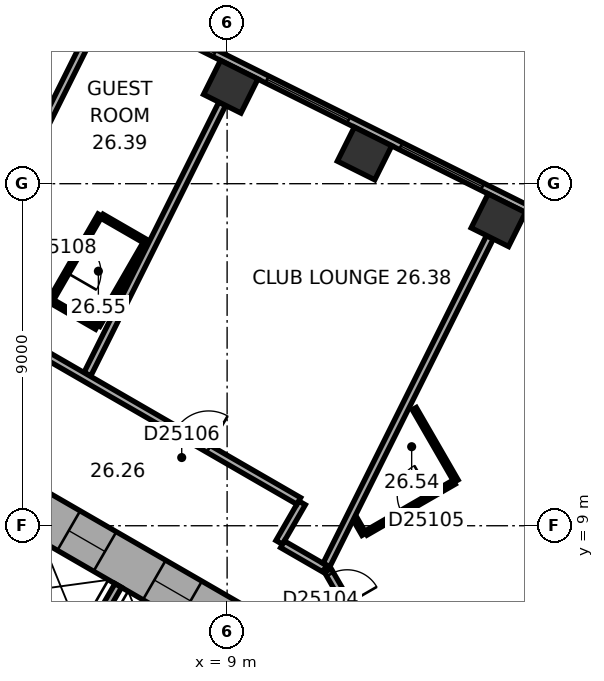
"""IFC4 building model, lengths in metres.
Left out: names, types, materials, properties, quantities, classifications, styles, units other than length and angle.
Written with IfcOpenShell. Run it as: python <this file> out.ifc"""

import sys

from ifc_helpers import new_model, si_unit, direction, frame, frame_2d, origin, origin_2d, place, context, subcontext, project, spatial, rectangle, extrude, element, fill, save


model = new_model("IFC4")
c1 = context("Model", 3, precision=1e-05, world=origin(), true_north=direction((0.0, 1.0)))
c2 = subcontext(c1, "Body", "Model", "MODEL_VIEW")
j1 = project(units=[si_unit("LENGTHUNIT", "METRE"), si_unit("PLANEANGLEUNIT", "RADIAN")], contexts=[c1])
p1 = place(None, origin())
s1 = spatial("IfcSite", under=j1, at=p1, CompositionType="ELEMENT")
p2 = place(p1, origin())
s2 = spatial("IfcBuilding", under=s1, at=p2, CompositionType="ELEMENT")
p3 = place(p2, frame((0.0, 0.0, 110.0)))
s3 = spatial("IfcBuildingStorey", under=s2, at=p3, CompositionType="ELEMENT", Elevation=110.0)
for number, where, z_axis, x_axis in (
    (1, (16.138, 17.04, 0.0), (0.0, 0.0, 1.0), (-0.895, 0.446, 0.0)),
    (2, (12.616, 18.795, 0.0), (0.0, 0.0, 1.0), (-0.895, 0.446, 0.0)),
    (3, (9.095, 20.551, 0.0), (0.0, 0.0, 1.0), (-0.895, 0.446, 0.0)),
):
    element("IfcColumn", number, at=place(p3, frame(where, z_axis=z_axis, x_axis=x_axis)), inside=s3, PredefinedType="COLUMN", context=c2, shape_type="SweptSolid", body=[
        extrude(rectangle(XDim=1.1, YDim=1.0, at=origin_2d()), origin(), (0.0, 0.0, 1.0), 3.3),
    ])
p4 = place(p3, frame((10.4, 5.658, 0.0), z_axis=(0.0, 0.0, 1.0), x_axis=(-0.866021384402, 0.500006961711, 0.0)))
e4 = element("IfcWall", 4, at=p4, inside=s3, PredefinedType="SHEAR", context=c2, shape_type="SweptSolid", body=[
    extrude(rectangle(XDim=12.355, YDim=1.2, at=frame_2d((6.178, 0.0))), origin(), (0.0, 0.0, 1.0), 3.3),
])
p5 = place(p4, frame((2.728, 0.0, 0.0)))
e5 = element("IfcOpeningElement", 5, at=p5, cuts=e4, PredefinedType="OPENING", context=c2, shape_type="SweptSolid", body=[
    extrude(rectangle(XDim=1.1, YDim=2.1, at=frame_2d((0.55, 1.05))), frame((0.0, 0.61, 0.0), z_axis=(0.0, -1.0, 0.0), x_axis=(1.0, 0.0, 0.0)), (0.0, 0.0, 1.0), 1.22),
])
p6 = place(p4, frame((5.328, 0.0, 0.0)))
e6 = element("IfcOpeningElement", 6, at=p6, cuts=e4, PredefinedType="OPENING", context=c2, shape_type="SweptSolid", body=[
    extrude(rectangle(XDim=1.1, YDim=2.1, at=frame_2d((0.55, 1.05))), frame((0.0, 0.61, 0.0), z_axis=(0.0, -1.0, 0.0), x_axis=(1.0, 0.0, 0.0)), (0.0, 0.0, 1.0), 1.22),
])
p7 = place(p4, frame((7.928, 0.0, 0.0)))
e7 = element("IfcOpeningElement", 7, at=p7, cuts=e4, PredefinedType="OPENING", context=c2, shape_type="SweptSolid", body=[
    extrude(rectangle(XDim=1.1, YDim=2.1, at=frame_2d((0.55, 1.05))), frame((0.0, 0.61, 0.0), z_axis=(0.0, -1.0, 0.0), x_axis=(1.0, 0.0, 0.0)), (0.0, 0.0, 1.0), 1.22),
])
p8 = place(p3, frame((20.63, 15.47, 0.0), z_axis=(0.0, 0.0, 1.0), x_axis=(-0.894934518609, 0.446197498203, 0.0)))
e8 = element("IfcWall", 8, at=p8, inside=s3, PredefinedType="STANDARD", context=c2, shape_type="SweptSolid", body=[
    extrude(rectangle(XDim=21.246, YDim=0.2, at=frame_2d((10.623, 0.0))), origin(), (0.0, 0.0, 1.0), 3.3),
])
p9 = place(p8, frame((1.553, 0.0, 0.8)))
e9 = element("IfcOpeningElement", 9, at=p9, cuts=e8, PredefinedType="OPENING", context=c2, shape_type="SweptSolid", body=[
    extrude(rectangle(XDim=2.4, YDim=1.7, at=frame_2d((1.2, 0.85))), frame((0.0, 0.11, 0.0), z_axis=(0.0, -1.0, 0.0), x_axis=(1.0, 0.0, 0.0)), (0.0, 0.0, 1.0), 0.22),
])
p10 = place(p8, frame((5.488, 0.0, 0.8)))
e10 = element("IfcOpeningElement", 10, at=p10, cuts=e8, PredefinedType="OPENING", context=c2, shape_type="SweptSolid", body=[
    extrude(rectangle(XDim=2.4, YDim=1.7, at=frame_2d((1.2, 0.85))), frame((0.0, 0.11, 0.0), z_axis=(0.0, -1.0, 0.0), x_axis=(1.0, 0.0, 0.0)), (0.0, 0.0, 1.0), 0.22),
])
p11 = place(p8, frame((9.422, 0.0, 0.8)))
e11 = element("IfcOpeningElement", 11, at=p11, cuts=e8, PredefinedType="OPENING", context=c2, shape_type="SweptSolid", body=[
    extrude(rectangle(XDim=2.4, YDim=1.7, at=frame_2d((1.2, 0.85))), frame((0.0, 0.11, 0.0), z_axis=(0.0, -1.0, 0.0), x_axis=(1.0, 0.0, 0.0)), (0.0, 0.0, 1.0), 0.22),
])
p12 = place(p8, frame((13.357, 0.0, 0.8)))
e12 = element("IfcOpeningElement", 12, at=p12, cuts=e8, PredefinedType="OPENING", context=c2, shape_type="SweptSolid", body=[
    extrude(rectangle(XDim=2.4, YDim=1.7, at=frame_2d((1.2, 0.85))), frame((0.0, 0.11, 0.0), z_axis=(0.0, -1.0, 0.0), x_axis=(1.0, 0.0, 0.0)), (0.0, 0.0, 1.0), 0.22),
])
p13 = place(p8, frame((17.292, 0.0, 0.8)))
e13 = element("IfcOpeningElement", 13, at=p13, cuts=e8, PredefinedType="OPENING", context=c2, shape_type="SweptSolid", body=[
    extrude(rectangle(XDim=2.4, YDim=1.7, at=frame_2d((1.2, 0.85))), frame((0.0, 0.11, 0.0), z_axis=(0.0, -1.0, 0.0), x_axis=(1.0, 0.0, 0.0)), (0.0, 0.0, 1.0), 0.22),
])
p14 = place(p3, frame((7.424, 4.259, 0.0), z_axis=(0.0, 0.0, 1.0), x_axis=(-0.866026010844, 0.49999894854, 0.0)))
e14 = element("IfcWall", 14, at=p14, inside=s3, PredefinedType="PARTITIONING", context=c2, shape_type="SweptSolid", body=[
    extrude(rectangle(XDim=8.0, YDim=0.2, at=frame_2d((4.0, 0.0))), origin(), (0.0, 0.0, 1.0), 3.05),
])
p15 = place(p3, frame((5.036, 5.522, 0.0), z_axis=(0.0, 0.0, 1.0), x_axis=(0.499946605688, 0.86605622881, 0.0)))
e15 = element("IfcWall", 15, at=p15, inside=s3, PredefinedType="PARTITIONING", context=c2, shape_type="SweptSolid", body=[
    extrude(rectangle(XDim=2.2, YDim=0.2, at=frame_2d((1.1, 0.0))), origin(), (0.0, 0.0, 1.0), 3.05),
])
p16 = place(p3, frame((6.303, 4.617, 0.0), z_axis=(0.0, 0.0, 1.0), x_axis=(-0.866027801685, 0.499995846692, 0.0)))
e16 = element("IfcWall", 16, at=p16, inside=s3, PredefinedType="SHEAR", context=c2, shape_type="SweptSolid", body=[
    extrude(rectangle(XDim=7.06, YDim=0.3, at=frame_2d((3.53, 0.0))), origin(), (0.0, 0.0, 1.0), 3.05),
])
p17 = place(p3, frame((4.356, 14.922, 0.0), z_axis=(0.0, 0.0, 1.0), x_axis=(0.499936506574, 0.866062058628, 0.0)))
e17 = element("IfcWall", 17, at=p17, inside=s3, PredefinedType="PARTITIONING", context=c2, shape_type="SweptSolid", body=[
    extrude(rectangle(XDim=2.6, YDim=0.12, at=frame_2d((1.3, 0.0))), origin(), (0.0, 0.0, 1.0), 3.05),
])
p18 = place(p17, frame((0.85, 0.0, 0.0)))
e18 = element("IfcOpeningElement", 18, at=p18, cuts=e17, PredefinedType="OPENING", context=c2, shape_type="SweptSolid", body=[
    extrude(rectangle(XDim=0.9, YDim=2.1, at=frame_2d((0.45, 1.05))), frame((0.0, 0.07, 0.0), z_axis=(0.0, -1.0, 0.0), x_axis=(1.0, 0.0, 0.0)), (0.0, 0.0, 1.0), 0.14),
])
p19 = place(p3, frame((5.351, 21.859, 0.0), z_axis=(0.0, 0.0, 1.0), x_axis=(-0.446205309328, -0.894930624086, 0.0)))
e19 = element("IfcWall", 19, at=p19, inside=s3, PredefinedType="PARTITIONING", context=c2, shape_type="SweptSolid", body=[
    extrude(rectangle(XDim=8.913, YDim=0.2, at=frame_2d((4.457, 0.0))), origin(), (0.0, 0.0, 1.0), 2.6),
])
p20 = place(p3, frame((5.569, 14.222, 0.0), z_axis=(0.0, 0.0, 1.0), x_axis=(-0.866036909293, 0.499980071345, 0.0)))
e20 = element("IfcWall", 20, at=p20, inside=s3, PredefinedType="PARTITIONING", context=c2, shape_type="SweptSolid", body=[
    extrude(rectangle(XDim=1.34, YDim=0.12, at=frame_2d((0.67, 0.0))), origin(), (0.0, 0.0, 1.0), 3.05),
])
p21 = place(p3, frame((5.708, 17.144, 0.0), z_axis=(0.0, 0.0, 1.0), x_axis=(0.866082447003, -0.499901185229, 0.0)))
e21 = element("IfcWall", 21, at=p21, inside=s3, PredefinedType="PARTITIONING", context=c2, shape_type="SweptSolid", body=[
    extrude(rectangle(XDim=1.34, YDim=0.12, at=frame_2d((0.67, 0.0))), origin(), (0.0, 0.0, 1.0), 3.05),
])
p22 = place(p3, frame((6.839, 16.422, 0.0), z_axis=(0.0, 0.0, 1.0), x_axis=(-0.50000366821, -0.866023285932, 0.0)))
e22 = element("IfcWall", 22, at=p22, inside=s3, PredefinedType="PARTITIONING", context=c2, shape_type="SweptSolid", body=[
    extrude(rectangle(XDim=2.48, YDim=0.12, at=frame_2d((1.24, 0.0))), origin(), (0.0, 0.0, 1.0), 3.05),
])
p23 = place(p3, frame((8.872, 20.104, 0.0), z_axis=(0.0, 0.0, 1.0), x_axis=(-0.446218378653, -0.894924107706, 0.0)))
e23 = element("IfcWall", 23, at=p23, inside=s3, PredefinedType="PARTITIONING", context=c2, shape_type="SweptSolid", body=[
    extrude(rectangle(XDim=7.95, YDim=0.2, at=frame_2d((3.975, 0.0))), origin(), (0.0, 0.0, 1.0), 3.05),
])
p24 = place(p3, frame((10.371, 8.561, 0.0), z_axis=(0.0, 0.0, 1.0), x_axis=(0.499986357472, 0.866033280158, 0.0)))
e24 = element("IfcWall", 24, at=p24, inside=s3, PredefinedType="PARTITIONING", context=c2, shape_type="SweptSolid", body=[
    extrude(rectangle(XDim=1.201, YDim=0.2, at=frame_2d((0.601, 0.0))), origin(), (0.0, 0.0, 1.0), 3.05),
])
p25 = place(p3, frame((10.885, 9.652, 0.0), z_axis=(0.0, 0.0, 1.0), x_axis=(-0.866033868542, 0.499985338323, 0.0)))
e25 = element("IfcWall", 25, at=p25, inside=s3, PredefinedType="PARTITIONING", context=c2, shape_type="SweptSolid", body=[
    extrude(rectangle(XDim=8.602, YDim=0.2, at=frame_2d((4.301, 0.0))), origin(), (0.0, 0.0, 1.0), 3.05),
])
p26 = place(p25, frame((2.739, 0.0, 0.0)))
e26 = element("IfcOpeningElement", 26, at=p26, cuts=e25, PredefinedType="OPENING", context=c2, shape_type="SweptSolid", body=[
    extrude(rectangle(XDim=1.0, YDim=2.1, at=frame_2d((0.5, 1.05))), frame((0.0, 0.11, 0.0), z_axis=(0.0, -1.0, 0.0), x_axis=(1.0, 0.0, 0.0)), (0.0, 0.0, 1.0), 0.22),
])
p27 = place(p3, frame((11.566, 7.871, 0.0), z_axis=(0.0, 0.0, 1.0), x_axis=(-0.866004557827, 0.500036104519, 0.0)))
e27 = element("IfcWall", 27, at=p27, inside=s3, PredefinedType="PARTITIONING", context=c2, shape_type="SweptSolid", body=[
    extrude(rectangle(XDim=1.28, YDim=0.2, at=frame_2d((0.64, 0.0))), origin(), (0.0, 0.0, 1.0), 3.05),
])
p28 = place(p3, frame((12.218, 6.839, 0.0), z_axis=(0.0, 0.0, 1.0), x_axis=(-0.500044870432, 0.865999496279, 0.0)))
e28 = element("IfcWall", 28, at=p28, inside=s3, PredefinedType="PARTITIONING", context=c2, shape_type="SweptSolid", body=[
    extrude(rectangle(XDim=1.136, YDim=0.2, at=frame_2d((0.568, 0.0))), origin(), (0.0, 0.0, 1.0), 3.05),
])
p29 = place(p28, frame((0.118, 0.0, 0.0)))
e29 = element("IfcOpeningElement", 29, at=p29, cuts=e28, PredefinedType="OPENING", context=c2, shape_type="SweptSolid", body=[
    extrude(rectangle(XDim=0.9, YDim=2.1, at=frame_2d((0.45, 1.05))), frame((0.0, 0.11, 0.0), z_axis=(0.0, -1.0, 0.0), x_axis=(1.0, 0.0, 0.0)), (0.0, 0.0, 1.0), 0.22),
])
p30 = place(p3, frame((12.601, 8.776, 0.0), z_axis=(0.0, 0.0, 1.0), x_axis=(-0.500166486798, 0.865929261247, 0.0)))
e30 = element("IfcWall", 30, at=p30, inside=s3, PredefinedType="PARTITIONING", context=c2, shape_type="SweptSolid", body=[
    extrude(rectangle(XDim=0.476, YDim=0.12, at=frame_2d((0.238, 0.0))), origin(), (0.0, 0.0, 1.0), 3.05),
])
p31 = place(p3, frame((13.926, 12.081, 0.0), z_axis=(0.0, 0.0, 1.0), x_axis=(0.499994660107, -0.866028486751, 0.0)))
e31 = element("IfcWall", 31, at=p31, inside=s3, PredefinedType="PARTITIONING", context=c2, shape_type="SweptSolid", body=[
    extrude(rectangle(XDim=2.2, YDim=0.12, at=frame_2d((1.1, 0.0))), origin(), (0.0, 0.0, 1.0), 3.05),
])
p32 = place(p3, frame((14.974, 10.146, 0.0), z_axis=(0.0, 0.0, 1.0), x_axis=(-0.86599746015, -0.500048396672, 0.0)))
e32 = element("IfcWall", 32, at=p32, inside=s3, PredefinedType="PARTITIONING", context=c2, shape_type="SweptSolid", body=[
    extrude(rectangle(XDim=2.68, YDim=0.12, at=frame_2d((1.34, 0.0))), origin(), (0.0, 0.0, 1.0), 3.05),
])
p33 = place(p32, frame((0.69, 0.0, 0.0)))
e33 = element("IfcOpeningElement", 33, at=p33, cuts=e32, PredefinedType="OPENING", context=c2, shape_type="SweptSolid", body=[
    extrude(rectangle(XDim=0.9, YDim=2.1, at=frame_2d((0.45, 1.05))), frame((0.0, 0.07, 0.0), z_axis=(0.0, -1.0, 0.0), x_axis=(1.0, 0.0, 0.0)), (0.0, 0.0, 1.0), 0.14),
])
p34 = place(p3, frame((15.915, 16.592, 0.0), z_axis=(0.0, 0.0, 1.0), x_axis=(-0.446199736347, -0.894933402709, 0.0)))
e34 = element("IfcWall", 34, at=p34, inside=s3, PredefinedType="PARTITIONING", context=c2, shape_type="SweptSolid", body=[
    extrude(rectangle(XDim=9.635, YDim=0.2, at=frame_2d((4.817, 0.0))), origin(), (0.0, 0.0, 1.0), 3.05),
])
p35 = place(p10, origin())
e35 = element("IfcWindow", 35, at=p35, inside=s3, PartitioningType="SINGLE_PANEL", PredefinedType="WINDOW", context=c2, shape_type="SweptSolid", body=[
    extrude(rectangle(XDim=2.4, YDim=1.7, at=frame_2d((1.2, 0.85))), frame((0.0, 0.03, 0.0), z_axis=(0.0, -1.0, 0.0), x_axis=(1.0, 0.0, 0.0)), (0.0, 0.0, 1.0), 0.06),
])
fill(e10, e35)
p36 = place(p11, origin())
e36 = element("IfcWindow", 36, at=p36, inside=s3, PartitioningType="SINGLE_PANEL", PredefinedType="WINDOW", context=c2, shape_type="SweptSolid", body=[
    extrude(rectangle(XDim=2.4, YDim=1.7, at=frame_2d((1.2, 0.85))), frame((0.0, 0.03, 0.0), z_axis=(0.0, -1.0, 0.0), x_axis=(1.0, 0.0, 0.0)), (0.0, 0.0, 1.0), 0.06),
])
fill(e11, e36)
p37 = place(p12, origin())
e37 = element("IfcWindow", 37, at=p37, inside=s3, PartitioningType="SINGLE_PANEL", PredefinedType="WINDOW", context=c2, shape_type="SweptSolid", body=[
    extrude(rectangle(XDim=2.4, YDim=1.7, at=frame_2d((1.2, 0.85))), frame((0.0, 0.03, 0.0), z_axis=(0.0, -1.0, 0.0), x_axis=(1.0, 0.0, 0.0)), (0.0, 0.0, 1.0), 0.06),
])
fill(e12, e37)
p38 = place(p5, origin())
e38 = element("IfcDoor", 38, at=p38, inside=s3, OperationType="DOUBLE_DOOR_SLIDING", PredefinedType="DOOR", context=c2, shape_type="SweptSolid", body=[
    extrude(rectangle(XDim=1.1, YDim=2.1, at=frame_2d((0.55, 1.05))), frame((0.0, 0.025, 0.0), z_axis=(0.0, -1.0, 0.0), x_axis=(1.0, 0.0, 0.0)), (0.0, 0.0, 1.0), 0.05),
])
fill(e5, e38)
p39 = place(p6, origin())
e39 = element("IfcDoor", 39, at=p39, inside=s3, OperationType="DOUBLE_DOOR_SLIDING", PredefinedType="DOOR", context=c2, shape_type="SweptSolid", body=[
    extrude(rectangle(XDim=1.1, YDim=2.1, at=frame_2d((0.55, 1.05))), frame((0.0, 0.025, 0.0), z_axis=(0.0, -1.0, 0.0), x_axis=(1.0, 0.0, 0.0)), (0.0, 0.0, 1.0), 0.05),
])
fill(e6, e39)
p40 = place(p29, origin())
e40 = element("IfcDoor", 40, at=p40, inside=s3, OperationType="SINGLE_SWING_LEFT", PredefinedType="DOOR", context=c2, shape_type="SweptSolid", body=[
    extrude(rectangle(XDim=0.9, YDim=2.1, at=frame_2d((0.45, 1.05))), frame((0.0, 0.025, 0.0), z_axis=(0.0, -1.0, 0.0), x_axis=(1.0, 0.0, 0.0)), (0.0, 0.0, 1.0), 0.05),
])
fill(e29, e40)
p41 = place(p33, origin())
e41 = element("IfcDoor", 41, at=p41, inside=s3, OperationType="SINGLE_SWING_LEFT", PredefinedType="DOOR", context=c2, shape_type="SweptSolid", body=[
    extrude(rectangle(XDim=0.9, YDim=2.1, at=frame_2d((0.45, 1.05))), frame((0.0, 0.025, 0.0), z_axis=(0.0, -1.0, 0.0), x_axis=(1.0, 0.0, 0.0)), (0.0, 0.0, 1.0), 0.05),
])
fill(e33, e41)
p42 = place(p26, origin())
e42 = element("IfcDoor", 42, at=p42, inside=s3, OperationType="SINGLE_SWING_LEFT", PredefinedType="DOOR", context=c2, shape_type="SweptSolid", body=[
    extrude(rectangle(XDim=1.0, YDim=2.1, at=frame_2d((0.5, 1.05))), frame((0.0, 0.025, 0.0), z_axis=(0.0, -1.0, 0.0), x_axis=(1.0, 0.0, 0.0)), (0.0, 0.0, 1.0), 0.05),
])
fill(e26, e42)
p43 = place(p18, origin())
e43 = element("IfcDoor", 43, at=p43, inside=s3, OperationType="SINGLE_SWING_LEFT", PredefinedType="DOOR", context=c2, shape_type="SweptSolid", body=[
    extrude(rectangle(XDim=0.9, YDim=2.1, at=frame_2d((0.45, 1.05))), frame((0.0, 0.025, 0.0), z_axis=(0.0, -1.0, 0.0), x_axis=(1.0, 0.0, 0.0)), (0.0, 0.0, 1.0), 0.05),
])
fill(e18, e43)
save(model, sys.argv[1])
